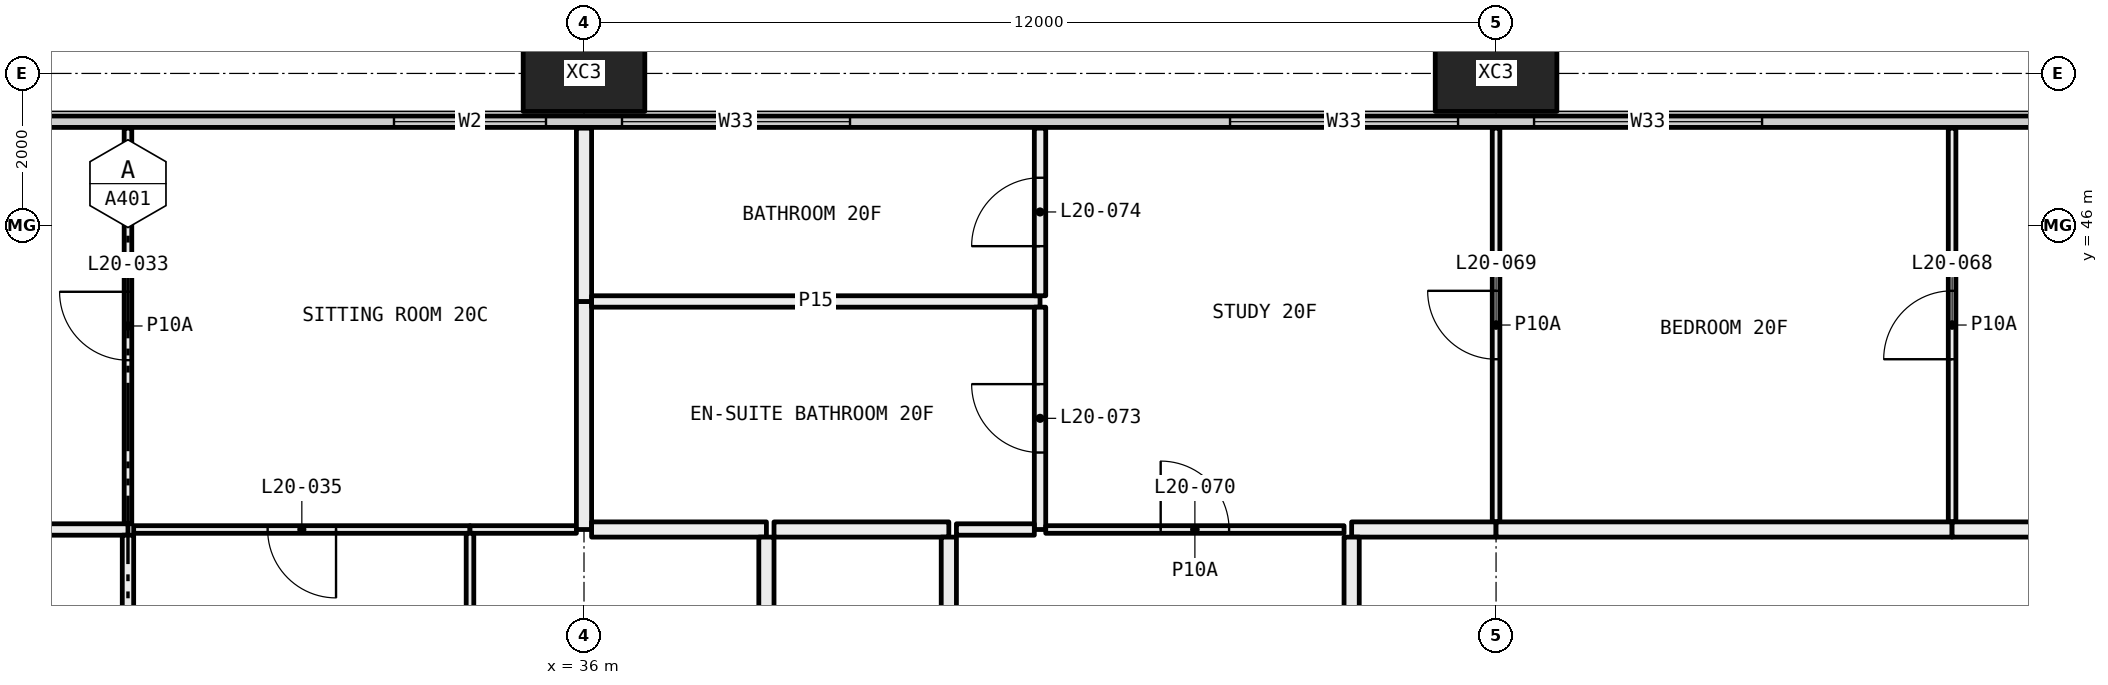
"""IFC4 building model, lengths in metres.
Left out: names, types, materials, properties, quantities, classifications, styles, units other than length and angle.
Written with IfcOpenShell. Run it as: python <this file> out.ifc"""

import sys

from ifc_helpers import new_model, si_unit, direction, frame, frame_2d, origin, origin_2d, place, context, subcontext, project, spatial, rectangle, hollow_rectangle, extrude, element, fill, save


model = new_model("IFC4")
c1 = context("Model", 3, precision=1e-05, world=origin(), true_north=direction((0.0, 1.0)))
c2 = subcontext(c1, "Body", "Model", "MODEL_VIEW")
j1 = project(units=[si_unit("LENGTHUNIT", "METRE"), si_unit("PLANEANGLEUNIT", "RADIAN")], contexts=[c1])
p1 = place(None, origin())
s1 = spatial("IfcSite", under=j1, at=p1, CompositionType="ELEMENT")
p2 = place(p1, origin())
s2 = spatial("IfcBuilding", under=s1, at=p2, CompositionType="ELEMENT")
p3 = place(p2, frame((0.0, 0.0, 81.75)))
s3 = spatial("IfcBuildingStorey", under=s2, at=p3, CompositionType="ELEMENT", Elevation=81.75)
for number, where, z_axis, x_axis in (
    (1, (36.0, 48.0, -0.4), (0.0, 0.0, 1.0), (1.0, 0.0, 0.0)),
    (2, (48.0, 48.0, -0.4), (0.0, 0.0, 1.0), (1.0, 0.0, 0.0)),
):
    element("IfcColumn", number, at=place(p3, frame(where, z_axis=z_axis, x_axis=x_axis)), inside=s3, PredefinedType="COLUMN", context=c2, shape_type="SweptSolid", body=[
        extrude(hollow_rectangle(XDim=1.6, YDim=1.0, WallThickness=0.065, at=origin_2d()), origin(), (0.0, 0.0, 1.0), 3.45),
    ])
p4 = place(p3, frame((6.56, 47.365, 0.0), z_axis=(0.0, 0.0, 1.0), x_axis=(1.0, 0.0, 0.0)))
e3 = element("IfcWall", 3, at=p4, inside=s3, PredefinedType="ELEMENTEDWALL", context=c2, shape_type="SweptSolid", body=[
    extrude(rectangle(XDim=58.88, YDim=0.15, at=frame_2d((29.44, 0.0))), origin(), (0.0, 0.0, 1.0), 3.05),
])
p5 = place(p4, frame((0.44, 0.0, 0.45)))
e4 = element("IfcOpeningElement", 4, at=p5, cuts=e3, PredefinedType="OPENING", context=c2, shape_type="SweptSolid", body=[
    extrude(rectangle(XDim=4.5, YDim=2.55, at=frame_2d((2.25, 1.275))), frame((0.0, 0.085, 0.0), z_axis=(0.0, -1.0, 0.0), x_axis=(1.0, 0.0, 0.0)), (0.0, 0.0, 1.0), 0.17),
])
p6 = place(p4, frame((5.94, 0.0, 0.45)))
e5 = element("IfcOpeningElement", 5, at=p6, cuts=e3, PredefinedType="OPENING", context=c2, shape_type="SweptSolid", body=[
    extrude(rectangle(XDim=3.0, YDim=2.55, at=frame_2d((1.5, 1.275))), frame((0.0, 0.085, 0.0), z_axis=(0.0, -1.0, 0.0), x_axis=(1.0, 0.0, 0.0)), (0.0, 0.0, 1.0), 0.17),
])
p7 = place(p4, frame((13.94, 0.0, 0.45)))
e6 = element("IfcOpeningElement", 6, at=p7, cuts=e3, PredefinedType="OPENING", context=c2, shape_type="SweptSolid", body=[
    extrude(rectangle(XDim=3.0, YDim=2.55, at=frame_2d((1.5, 1.275))), frame((0.0, 0.085, 0.0), z_axis=(0.0, -1.0, 0.0), x_axis=(1.0, 0.0, 0.0)), (0.0, 0.0, 1.0), 0.17),
])
p8 = place(p4, frame((17.94, 0.0, 0.45)))
e7 = element("IfcOpeningElement", 7, at=p8, cuts=e3, PredefinedType="OPENING", context=c2, shape_type="SweptSolid", body=[
    extrude(rectangle(XDim=3.0, YDim=2.55, at=frame_2d((1.5, 1.275))), frame((0.0, 0.085, 0.0), z_axis=(0.0, -1.0, 0.0), x_axis=(1.0, 0.0, 0.0)), (0.0, 0.0, 1.0), 0.17),
])
p9 = place(p4, frame((26.94, 0.0, 0.45)))
e8 = element("IfcOpeningElement", 8, at=p9, cuts=e3, PredefinedType="OPENING", context=c2, shape_type="SweptSolid", body=[
    extrude(rectangle(XDim=2.0, YDim=2.55, at=frame_2d((1.0, 1.275))), frame((0.0, 0.085, 0.0), z_axis=(0.0, -1.0, 0.0), x_axis=(1.0, 0.0, 0.0)), (0.0, 0.0, 1.0), 0.17),
])
p10 = place(p4, frame((29.94, 0.0, 0.45)))
e9 = element("IfcOpeningElement", 9, at=p10, cuts=e3, PredefinedType="OPENING", context=c2, shape_type="SweptSolid", body=[
    extrude(rectangle(XDim=3.0, YDim=2.55, at=frame_2d((1.5, 1.275))), frame((0.0, 0.085, 0.0), z_axis=(0.0, -1.0, 0.0), x_axis=(1.0, 0.0, 0.0)), (0.0, 0.0, 1.0), 0.17),
])
p11 = place(p4, frame((37.94, 0.0, 0.45)))
e10 = element("IfcOpeningElement", 10, at=p11, cuts=e3, PredefinedType="OPENING", context=c2, shape_type="SweptSolid", body=[
    extrude(rectangle(XDim=3.0, YDim=2.55, at=frame_2d((1.5, 1.275))), frame((0.0, 0.085, 0.0), z_axis=(0.0, -1.0, 0.0), x_axis=(1.0, 0.0, 0.0)), (0.0, 0.0, 1.0), 0.17),
])
p12 = place(p4, frame((41.94, 0.0, 0.45)))
e11 = element("IfcOpeningElement", 11, at=p12, cuts=e3, PredefinedType="OPENING", context=c2, shape_type="SweptSolid", body=[
    extrude(rectangle(XDim=3.0, YDim=2.55, at=frame_2d((1.5, 1.275))), frame((0.0, 0.085, 0.0), z_axis=(0.0, -1.0, 0.0), x_axis=(1.0, 0.0, 0.0)), (0.0, 0.0, 1.0), 0.17),
])
p13 = place(p4, frame((50.94, 0.0, 0.45)))
e12 = element("IfcOpeningElement", 12, at=p13, cuts=e3, PredefinedType="OPENING", context=c2, shape_type="SweptSolid", body=[
    extrude(rectangle(XDim=2.0, YDim=2.55, at=frame_2d((1.0, 1.275))), frame((0.0, 0.085, 0.0), z_axis=(0.0, -1.0, 0.0), x_axis=(1.0, 0.0, 0.0)), (0.0, 0.0, 1.0), 0.17),
])
p14 = place(p4, frame((53.94, 0.0, 0.45)))
e13 = element("IfcOpeningElement", 13, at=p14, cuts=e3, PredefinedType="OPENING", context=c2, shape_type="SweptSolid", body=[
    extrude(rectangle(XDim=4.5, YDim=2.55, at=frame_2d((2.25, 1.275))), frame((0.0, 0.085, 0.0), z_axis=(0.0, -1.0, 0.0), x_axis=(1.0, 0.0, 0.0)), (0.0, 0.0, 1.0), 0.17),
])
p15 = place(p3, frame((30.0, 42.075, 0.0), z_axis=(0.0, 0.0, 1.0), x_axis=(0.0, 1.0, 0.0)))
e14 = element("IfcWall", 14, at=p15, inside=s3, PredefinedType="PARTITIONING", context=c2, shape_type="SweptSolid", body=[
    extrude(rectangle(XDim=5.205, YDim=0.1, at=frame_2d((2.603, 0.0))), origin(), (0.0, 0.0, 1.0), 3.05),
])
p16 = place(p15, frame((2.153, 0.0, 0.0)))
e15 = element("IfcOpeningElement", 15, at=p16, cuts=e14, PredefinedType="OPENING", context=c2, shape_type="SweptSolid", body=[
    extrude(rectangle(XDim=0.9, YDim=2.1, at=frame_2d((0.45, 1.05))), frame((0.0, 0.06, 0.0), z_axis=(0.0, -1.0, 0.0), x_axis=(1.0, 0.0, 0.0)), (0.0, 0.0, 1.0), 0.12),
])
p17 = place(p3, frame((26.0, 42.0, 0.0), z_axis=(0.0, 0.0, 1.0), x_axis=(1.0, 0.0, 0.0)))
e16 = element("IfcWall", 16, at=p17, inside=s3, PredefinedType="PARTITIONING", context=c2, shape_type="SweptSolid", body=[
    extrude(rectangle(XDim=4.0, YDim=0.15, at=frame_2d((2.0, 0.0))), origin(), (0.0, 0.0, 1.0), 3.05),
])
p18 = place(p17, frame((1.55, 0.0, 0.0)))
e17 = element("IfcOpeningElement", 17, at=p18, cuts=e16, PredefinedType="OPENING", context=c2, shape_type="SweptSolid", body=[
    extrude(rectangle(XDim=0.9, YDim=2.1, at=frame_2d((0.45, 1.05))), frame((0.0, 0.085, 0.0), z_axis=(0.0, -1.0, 0.0), x_axis=(1.0, 0.0, 0.0)), (0.0, 0.0, 1.0), 0.17),
])
p19 = place(p3, frame((30.075, 42.0, 0.0), z_axis=(0.0, 0.0, 1.0), x_axis=(1.0, 0.0, 0.0)))
e18 = element("IfcWall", 18, at=p19, inside=s3, PredefinedType="PARTITIONING", context=c2, shape_type="SweptSolid", body=[
    extrude(rectangle(XDim=4.425, YDim=0.1, at=frame_2d((2.212, 0.0))), origin(), (0.0, 0.0, 1.0), 3.05),
])
p20 = place(p19, frame((1.762, 0.0, 0.0)))
e19 = element("IfcOpeningElement", 19, at=p20, cuts=e18, PredefinedType="OPENING", context=c2, shape_type="SweptSolid", body=[
    extrude(rectangle(XDim=0.9, YDim=2.1, at=frame_2d((0.45, 1.05))), frame((0.0, 0.06, 0.0), z_axis=(0.0, -1.0, 0.0), x_axis=(1.0, 0.0, 0.0)), (0.0, 0.0, 1.0), 0.12),
])
p21 = place(p3, frame((34.5, 42.0, 0.0), z_axis=(0.0, 0.0, 1.0), x_axis=(1.0, 0.0, 0.0)))
e20 = element("IfcWall", 20, at=p21, inside=s3, PredefinedType="PARTITIONING", context=c2, shape_type="SweptSolid", body=[
    extrude(rectangle(XDim=1.4, YDim=0.1, at=frame_2d((0.7, 0.0))), origin(), (0.0, 0.0, 1.0), 3.05),
])
p22 = place(p3, frame((36.0, 42.0, 0.0), z_axis=(0.0, 0.0, 1.0), x_axis=(0.0, 1.0, 0.0)))
e21 = element("IfcWall", 21, at=p22, inside=s3, PredefinedType="PARTITIONING", context=c2, shape_type="SweptSolid", body=[
    extrude(rectangle(XDim=3.0, YDim=0.2, at=frame_2d((1.5, 0.0))), origin(), (0.0, 0.0, 1.0), 2.45),
])
p23 = place(p3, frame((36.0, 45.0, 0.0), z_axis=(0.0, 0.0, 1.0), x_axis=(0.0, 1.0, 0.0)))
e22 = element("IfcWall", 22, at=p23, inside=s3, PredefinedType="PARTITIONING", context=c2, shape_type="SweptSolid", body=[
    extrude(rectangle(XDim=2.28, YDim=0.2, at=frame_2d((1.14, 0.0))), origin(), (0.0, 0.0, 1.0), 2.45),
])
p24 = place(p3, frame((30.0, 38.175, 0.0), z_axis=(0.0, 0.0, 1.0), x_axis=(0.0, 1.0, 0.0)))
e23 = element("IfcWall", 23, at=p24, inside=s3, PredefinedType="PARTITIONING", context=c2, shape_type="SweptSolid", body=[
    extrude(rectangle(XDim=3.75, YDim=0.15, at=frame_2d((1.875, 0.0))), origin(), (0.0, 0.0, 1.0), 3.05),
])
p25 = place(p3, frame((34.5, 36.1, 0.0), z_axis=(0.0, 0.0, 1.0), x_axis=(0.0, 1.0, 0.0)))
e24 = element("IfcWall", 24, at=p25, inside=s3, PredefinedType="PARTITIONING", context=c2, shape_type="SweptSolid", body=[
    extrude(rectangle(XDim=5.85, YDim=0.1, at=frame_2d((2.925, 0.0))), origin(), (0.0, 0.0, 1.0), 3.05),
])
p26 = place(p25, frame((2.475, 0.0, 0.0)))
e25 = element("IfcOpeningElement", 25, at=p26, cuts=e24, PredefinedType="OPENING", context=c2, shape_type="SweptSolid", body=[
    extrude(rectangle(XDim=0.9, YDim=2.1, at=frame_2d((0.45, 1.05))), frame((0.0, 0.06, 0.0), z_axis=(0.0, -1.0, 0.0), x_axis=(1.0, 0.0, 0.0)), (0.0, 0.0, 1.0), 0.12),
])
p27 = place(p3, frame((38.4, 42.0, 0.0), z_axis=(0.0, 0.0, 1.0), x_axis=(-1.0, 0.0, 0.0)))
e26 = element("IfcWall", 26, at=p27, inside=s3, PredefinedType="PARTITIONING", context=c2, shape_type="SweptSolid", body=[
    extrude(rectangle(XDim=2.3, YDim=0.2, at=frame_2d((1.15, 0.0))), origin(), (0.0, 0.0, 1.0), 3.05),
])
p28 = place(p3, frame((38.4, 36.1, 0.0), z_axis=(0.0, 0.0, 1.0), x_axis=(0.0, 1.0, 0.0)))
e27 = element("IfcWall", 27, at=p28, inside=s3, PredefinedType="PARTITIONING", context=c2, shape_type="SweptSolid", body=[
    extrude(rectangle(XDim=5.8, YDim=0.2, at=frame_2d((2.9, 0.0))), origin(), (0.0, 0.0, 1.0), 3.05),
])
p29 = place(p3, frame((42.0, 45.0, 0.0), z_axis=(0.0, 0.0, 1.0), x_axis=(-1.0, 0.0, 0.0)))
e28 = element("IfcWall", 28, at=p29, inside=s3, PredefinedType="PARTITIONING", context=c2, shape_type="SweptSolid", body=[
    extrude(rectangle(XDim=5.9, YDim=0.15, at=frame_2d((2.95, 0.0))), origin(), (0.0, 0.0, 1.0), 3.05),
])
p30 = place(p3, frame((42.0, 42.0, 0.0), z_axis=(0.0, 0.0, 1.0), x_axis=(0.0, 1.0, 0.0)))
e29 = element("IfcWall", 29, at=p30, inside=s3, PredefinedType="PARTITIONING", context=c2, shape_type="SweptSolid", body=[
    extrude(rectangle(XDim=2.925, YDim=0.15, at=frame_2d((1.462, 0.0))), origin(), (0.0, 0.0, 1.0), 3.05),
])
p31 = place(p30, frame((1.012, 0.0, 0.0)))
e30 = element("IfcOpeningElement", 30, at=p31, cuts=e29, PredefinedType="OPENING", context=c2, shape_type="SweptSolid", body=[
    extrude(rectangle(XDim=0.9, YDim=2.1, at=frame_2d((0.45, 1.05))), frame((0.0, 0.085, 0.0), z_axis=(0.0, -1.0, 0.0), x_axis=(1.0, 0.0, 0.0)), (0.0, 0.0, 1.0), 0.17),
])
p32 = place(p3, frame((40.9, 42.0, 0.0), z_axis=(0.0, 0.0, 1.0), x_axis=(1.0, 0.0, 0.0)))
e31 = element("IfcWall", 31, at=p32, inside=s3, PredefinedType="PARTITIONING", context=c2, shape_type="SweptSolid", body=[
    extrude(rectangle(XDim=1.025, YDim=0.15, at=frame_2d((0.513, 0.0))), origin(), (0.0, 0.0, 1.0), 3.05),
])
p33 = place(p3, frame((38.5, 42.0, 0.0), z_axis=(0.0, 0.0, 1.0), x_axis=(1.0, 0.0, 0.0)))
e32 = element("IfcWall", 32, at=p33, inside=s3, PredefinedType="PARTITIONING", context=c2, shape_type="SweptSolid", body=[
    extrude(rectangle(XDim=2.3, YDim=0.2, at=frame_2d((1.15, 0.0))), origin(), (0.0, 0.0, 1.0), 3.05),
])
p34 = place(p3, frame((42.0, 45.075, 0.0), z_axis=(0.0, 0.0, 1.0), x_axis=(0.0, 1.0, 0.0)))
e33 = element("IfcWall", 33, at=p34, inside=s3, PredefinedType="PARTITIONING", context=c2, shape_type="SweptSolid", body=[
    extrude(rectangle(XDim=2.205, YDim=0.15, at=frame_2d((1.103, 0.0))), origin(), (0.0, 0.0, 1.0), 3.05),
])
p35 = place(p34, frame((0.653, 0.0, 0.0)))
e34 = element("IfcOpeningElement", 34, at=p35, cuts=e33, PredefinedType="OPENING", context=c2, shape_type="SweptSolid", body=[
    extrude(rectangle(XDim=0.9, YDim=2.1, at=frame_2d((0.45, 1.05))), frame((0.0, 0.085, 0.0), z_axis=(0.0, -1.0, 0.0), x_axis=(1.0, 0.0, 0.0)), (0.0, 0.0, 1.0), 0.17),
])
p36 = place(p3, frame((48.0, 42.1, 0.0), z_axis=(0.0, 0.0, 1.0), x_axis=(0.0, 1.0, 0.0)))
e35 = element("IfcWall", 35, at=p36, inside=s3, PredefinedType="PARTITIONING", context=c2, shape_type="SweptSolid", body=[
    extrude(rectangle(XDim=5.18, YDim=0.1, at=frame_2d((2.59, 0.0))), origin(), (0.0, 0.0, 1.0), 3.05),
])
p37 = place(p36, frame((2.14, 0.0, 0.0)))
e36 = element("IfcOpeningElement", 36, at=p37, cuts=e35, PredefinedType="OPENING", context=c2, shape_type="SweptSolid", body=[
    extrude(rectangle(XDim=0.9, YDim=2.1, at=frame_2d((0.45, 1.05))), frame((0.0, 0.06, 0.0), z_axis=(0.0, -1.0, 0.0), x_axis=(1.0, 0.0, 0.0)), (0.0, 0.0, 1.0), 0.12),
])
p38 = place(p3, frame((42.075, 42.0, 0.0), z_axis=(0.0, 0.0, 1.0), x_axis=(1.0, 0.0, 0.0)))
e37 = element("IfcWall", 37, at=p38, inside=s3, PredefinedType="PARTITIONING", context=c2, shape_type="SweptSolid", body=[
    extrude(rectangle(XDim=3.925, YDim=0.1, at=frame_2d((1.962, 0.0))), origin(), (0.0, 0.0, 1.0), 3.05),
])
p39 = place(p38, frame((1.512, 0.0, 0.0)))
e38 = element("IfcOpeningElement", 38, at=p39, cuts=e37, PredefinedType="OPENING", context=c2, shape_type="SweptSolid", body=[
    extrude(rectangle(XDim=0.9, YDim=2.1, at=frame_2d((0.45, 1.05))), frame((0.0, 0.06, 0.0), z_axis=(0.0, -1.0, 0.0), x_axis=(1.0, 0.0, 0.0)), (0.0, 0.0, 1.0), 0.12),
])
p40 = place(p3, frame((46.1, 42.0, 0.0), z_axis=(0.0, 0.0, 1.0), x_axis=(1.0, 0.0, 0.0)))
e39 = element("IfcWall", 39, at=p40, inside=s3, PredefinedType="PARTITIONING", context=c2, shape_type="SweptSolid", body=[
    extrude(rectangle(XDim=1.9, YDim=0.2, at=frame_2d((0.95, 0.0))), origin(), (0.0, 0.0, 1.0), 3.05),
])
p41 = place(p3, frame((54.0, 42.1, 0.0), z_axis=(0.0, 0.0, 1.0), x_axis=(0.0, 1.0, 0.0)))
e40 = element("IfcWall", 40, at=p41, inside=s3, PredefinedType="PARTITIONING", context=c2, shape_type="SweptSolid", body=[
    extrude(rectangle(XDim=5.18, YDim=0.1, at=frame_2d((2.59, 0.0))), origin(), (0.0, 0.0, 1.0), 3.05),
])
p42 = place(p41, frame((2.14, 0.0, 0.0)))
e41 = element("IfcOpeningElement", 41, at=p42, cuts=e40, PredefinedType="OPENING", context=c2, shape_type="SweptSolid", body=[
    extrude(rectangle(XDim=0.9, YDim=2.1, at=frame_2d((0.45, 1.05))), frame((0.0, 0.06, 0.0), z_axis=(0.0, -1.0, 0.0), x_axis=(1.0, 0.0, 0.0)), (0.0, 0.0, 1.0), 0.12),
])
p43 = place(p3, frame((48.0, 42.0, 0.0), z_axis=(0.0, 0.0, 1.0), x_axis=(1.0, 0.0, 0.0)))
e42 = element("IfcWall", 42, at=p43, inside=s3, PredefinedType="PARTITIONING", context=c2, shape_type="SweptSolid", body=[
    extrude(rectangle(XDim=6.0, YDim=0.2, at=frame_2d((3.0, 0.0))), origin(), (0.0, 0.0, 1.0), 3.05),
])
p44 = place(p3, frame((54.0, 42.0, 0.0), z_axis=(0.0, 0.0, 1.0), x_axis=(1.0, 0.0, 0.0)))
e43 = element("IfcWall", 43, at=p44, inside=s3, PredefinedType="PARTITIONING", context=c2, shape_type="SweptSolid", body=[
    extrude(rectangle(XDim=6.0, YDim=0.2, at=frame_2d((3.0, 0.0))), origin(), (0.0, 0.0, 1.0), 3.05),
])
p45 = place(p44, frame((2.5, 0.0, 0.0)))
e44 = element("IfcOpeningElement", 44, at=p45, cuts=e43, PredefinedType="OPENING", context=c2, shape_type="SweptSolid", body=[
    extrude(rectangle(XDim=1.0, YDim=2.1, at=frame_2d((0.5, 1.05))), frame((0.0, 0.11, 0.0), z_axis=(0.0, -1.0, 0.0), x_axis=(1.0, 0.0, 0.0)), (0.0, 0.0, 1.0), 0.22),
])
p46 = place(p3, frame((40.8, 41.9, 0.0), z_axis=(0.0, 0.0, 1.0), x_axis=(0.0, -1.0, 0.0)))
e45 = element("IfcWall", 45, at=p46, inside=s3, PredefinedType="PARTITIONING", context=c2, shape_type="SweptSolid", body=[
    extrude(rectangle(XDim=6.2, YDim=0.2, at=frame_2d((3.1, 0.0))), origin(), (0.0, 0.0, 1.0), 2.45),
])
p47 = place(p3, frame((46.1, 36.1, 0.0), z_axis=(0.0, 0.0, 1.0), x_axis=(0.0, 1.0, 0.0)))
e46 = element("IfcWall", 46, at=p47, inside=s3, PredefinedType="PARTITIONING", context=c2, shape_type="SweptSolid", body=[
    extrude(rectangle(XDim=5.8, YDim=0.2, at=frame_2d((2.9, 0.0))), origin(), (0.0, 0.0, 1.0), 3.05),
])
p48 = place(p9, origin())
e47 = element("IfcWindow", 47, at=p48, inside=s3, PartitioningType="SINGLE_PANEL", PredefinedType="WINDOW", context=c2, shape_type="SweptSolid", body=[
    extrude(rectangle(XDim=2.0, YDim=2.55, at=frame_2d((1.0, 1.275))), frame((0.0, 0.03, 0.0), z_axis=(0.0, -1.0, 0.0), x_axis=(1.0, 0.0, 0.0)), (0.0, 0.0, 1.0), 0.06),
])
fill(e8, e47)
p49 = place(p10, origin())
e48 = element("IfcWindow", 48, at=p49, inside=s3, PartitioningType="SINGLE_PANEL", PredefinedType="WINDOW", context=c2, shape_type="SweptSolid", body=[
    extrude(rectangle(XDim=3.0, YDim=2.55, at=frame_2d((1.5, 1.275))), frame((0.0, 0.03, 0.0), z_axis=(0.0, -1.0, 0.0), x_axis=(1.0, 0.0, 0.0)), (0.0, 0.0, 1.0), 0.06),
])
fill(e9, e48)
p50 = place(p11, origin())
e49 = element("IfcWindow", 49, at=p50, inside=s3, PartitioningType="SINGLE_PANEL", PredefinedType="WINDOW", context=c2, shape_type="SweptSolid", body=[
    extrude(rectangle(XDim=3.0, YDim=2.55, at=frame_2d((1.5, 1.275))), frame((0.0, 0.03, 0.0), z_axis=(0.0, -1.0, 0.0), x_axis=(1.0, 0.0, 0.0)), (0.0, 0.0, 1.0), 0.06),
])
fill(e10, e49)
p51 = place(p12, origin())
e50 = element("IfcWindow", 50, at=p51, inside=s3, PartitioningType="SINGLE_PANEL", PredefinedType="WINDOW", context=c2, shape_type="SweptSolid", body=[
    extrude(rectangle(XDim=3.0, YDim=2.55, at=frame_2d((1.5, 1.275))), frame((0.0, 0.03, 0.0), z_axis=(0.0, -1.0, 0.0), x_axis=(1.0, 0.0, 0.0)), (0.0, 0.0, 1.0), 0.06),
])
fill(e11, e50)
p52 = place(p16, origin())
e51 = element("IfcDoor", 51, at=p52, inside=s3, OperationType="SINGLE_SWING_LEFT", PredefinedType="DOOR", context=c2, shape_type="SweptSolid", body=[
    extrude(rectangle(XDim=0.9, YDim=2.1, at=frame_2d((0.45, 1.05))), frame((0.0, 0.025, 0.0), z_axis=(0.0, -1.0, 0.0), x_axis=(1.0, 0.0, 0.0)), (0.0, 0.0, 1.0), 0.05),
])
fill(e15, e51)
p53 = place(p20, frame((0.9, 0.0, 0.0), x_axis=(-1.0, 0.0, 0.0)))
e52 = element("IfcDoor", 52, at=p53, inside=s3, OperationType="SINGLE_SWING_RIGHT", PredefinedType="DOOR", context=c2, shape_type="SweptSolid", body=[
    extrude(rectangle(XDim=0.9, YDim=2.1, at=frame_2d((0.45, 1.05))), frame((0.0, 0.025, 0.0), z_axis=(0.0, -1.0, 0.0), x_axis=(1.0, 0.0, 0.0)), (0.0, 0.0, 1.0), 0.05),
])
fill(e19, e52)
p54 = place(p42, origin())
e53 = element("IfcDoor", 53, at=p54, inside=s3, OperationType="SINGLE_SWING_RIGHT", PredefinedType="DOOR", context=c2, shape_type="SweptSolid", body=[
    extrude(rectangle(XDim=0.9, YDim=2.1, at=frame_2d((0.45, 1.05))), frame((0.0, 0.025, 0.0), z_axis=(0.0, -1.0, 0.0), x_axis=(1.0, 0.0, 0.0)), (0.0, 0.0, 1.0), 0.05),
])
fill(e41, e53)
p55 = place(p37, origin())
e54 = element("IfcDoor", 54, at=p55, inside=s3, OperationType="SINGLE_SWING_LEFT", PredefinedType="DOOR", context=c2, shape_type="SweptSolid", body=[
    extrude(rectangle(XDim=0.9, YDim=2.1, at=frame_2d((0.45, 1.05))), frame((0.0, 0.025, 0.0), z_axis=(0.0, -1.0, 0.0), x_axis=(1.0, 0.0, 0.0)), (0.0, 0.0, 1.0), 0.05),
])
fill(e36, e54)
p56 = place(p39, origin())
e55 = element("IfcDoor", 55, at=p56, inside=s3, OperationType="SINGLE_SWING_RIGHT", PredefinedType="DOOR", context=c2, shape_type="SweptSolid", body=[
    extrude(rectangle(XDim=0.9, YDim=2.1, at=frame_2d((0.45, 1.05))), frame((0.0, 0.025, 0.0), z_axis=(0.0, -1.0, 0.0), x_axis=(1.0, 0.0, 0.0)), (0.0, 0.0, 1.0), 0.05),
])
fill(e38, e55)
p57 = place(p31, origin())
e56 = element("IfcDoor", 56, at=p57, inside=s3, OperationType="SINGLE_SWING_LEFT", PredefinedType="DOOR", context=c2, shape_type="SweptSolid", body=[
    extrude(rectangle(XDim=0.9, YDim=2.1, at=frame_2d((0.45, 1.05))), frame((0.0, 0.025, 0.0), z_axis=(0.0, -1.0, 0.0), x_axis=(1.0, 0.0, 0.0)), (0.0, 0.0, 1.0), 0.05),
])
fill(e30, e56)
p58 = place(p35, origin())
e57 = element("IfcDoor", 57, at=p58, inside=s3, OperationType="SINGLE_SWING_RIGHT", PredefinedType="DOOR", context=c2, shape_type="SweptSolid", body=[
    extrude(rectangle(XDim=0.9, YDim=2.1, at=frame_2d((0.45, 1.05))), frame((0.0, 0.025, 0.0), z_axis=(0.0, -1.0, 0.0), x_axis=(1.0, 0.0, 0.0)), (0.0, 0.0, 1.0), 0.05),
])
fill(e34, e57)
save(model, sys.argv[1])
